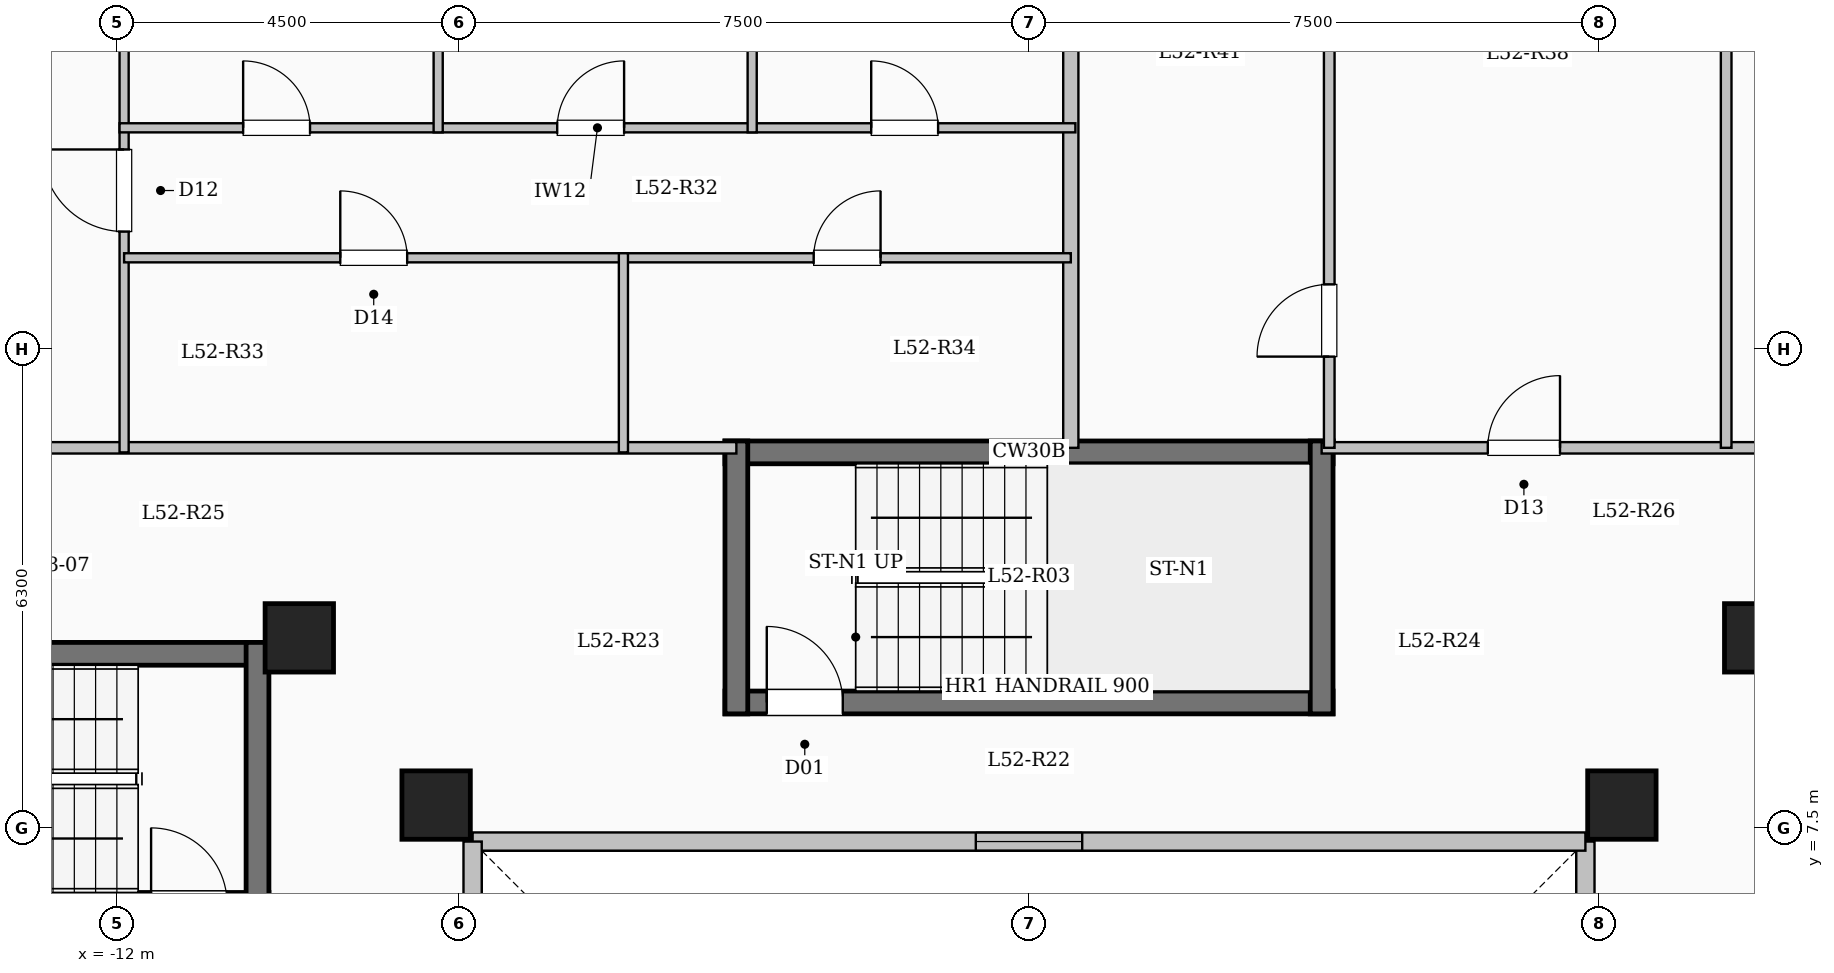
"""IFC4 building model, lengths in metres.
Left out: names, types, materials, properties, quantities, classifications, styles, units other than length and angle.
Written with IfcOpenShell. Run it as: python <this file> out.ifc"""

import sys

from ifc_helpers import new_model, si_unit, direction, frame, frame_2d, origin, origin_2d, place, context, subcontext, project, spatial, rectangle, extrude, element, fill, save


model = new_model("IFC4")
c1 = context("Model", 3, precision=1e-05, world=origin(), true_north=direction((0.0, 1.0)))
c2 = subcontext(c1, "Body", "Model", "MODEL_VIEW")
j1 = project(units=[si_unit("LENGTHUNIT", "METRE"), si_unit("PLANEANGLEUNIT", "RADIAN")], contexts=[c1])
p1 = place(None, origin())
s1 = spatial("IfcSite", under=j1, at=p1, CompositionType="ELEMENT")
p2 = place(p1, origin())
s2 = spatial("IfcBuilding", under=s1, at=p2, CompositionType="ELEMENT")
p3 = place(p2, frame((0.0, 0.0, 193.6)))
s3 = spatial("IfcBuildingStorey", under=s2, at=p3, CompositionType="ELEMENT", Elevation=193.6)
for number, where, z_axis, x_axis in (
    (1, (-7.8, 7.8, 0.0), (0.0, 0.0, 1.0), (1.0, 0.0, 0.0)),
    (2, (7.8, 7.8, 0.0), (0.0, 0.0, 1.0), (1.0, 0.0, 0.0)),
    (3, (-9.6, 10.0, 0.0), (0.0, 0.0, 1.0), (1.0, 0.0, 0.0)),
    (4, (9.6, 10.0, 0.0), (0.0, 0.0, 1.0), (1.0, 0.0, 0.0)),
):
    element("IfcColumn", number, at=place(p3, frame(where, z_axis=z_axis, x_axis=x_axis)), inside=s3, PredefinedType="COLUMN", context=c2, shape_type="SweptSolid", body=[
        extrude(rectangle(XDim=0.9, YDim=0.9, at=origin_2d()), origin(), (0.0, 0.0, 1.0), 3.35),
    ])
p4 = place(p3, frame((7.32, -7.32, 0.0), z_axis=(0.0, 0.0, 1.0), x_axis=(0.0, 1.0, 0.0)))
e5 = element("IfcWall", 5, at=p4, inside=s3, PredefinedType="SOLIDWALL", context=c2, shape_type="SweptSolid", body=[
    extrude(rectangle(XDim=14.64, YDim=0.24, at=frame_2d((7.32, 0.0))), origin(), (0.0, 0.0, 1.0), 3.1),
])
p5 = place(p4, frame((6.62, 0.0, 0.95)))
e6 = element("IfcOpeningElement", 6, at=p5, cuts=e5, PredefinedType="OPENING", context=c2, shape_type="SweptSolid", body=[
    extrude(rectangle(XDim=1.4, YDim=1.5, at=frame_2d((0.7, 0.75))), frame((0.0, 0.13, 0.0), z_axis=(0.0, -1.0, 0.0), x_axis=(1.0, 0.0, 0.0)), (0.0, 0.0, 1.0), 0.26),
])
p6 = place(p3, frame((7.32, 7.32, 0.0), z_axis=(0.0, 0.0, 1.0), x_axis=(-1.0, 0.0, 0.0)))
e7 = element("IfcWall", 7, at=p6, inside=s3, PredefinedType="SOLIDWALL", context=c2, shape_type="SweptSolid", body=[
    extrude(rectangle(XDim=14.64, YDim=0.24, at=frame_2d((7.32, 0.0))), origin(), (0.0, 0.0, 1.0), 3.1),
])
p7 = place(p6, frame((6.62, 0.0, 0.95)))
e8 = element("IfcOpeningElement", 8, at=p7, cuts=e7, PredefinedType="OPENING", context=c2, shape_type="SweptSolid", body=[
    extrude(rectangle(XDim=1.4, YDim=1.5, at=frame_2d((0.7, 0.75))), frame((0.0, 0.13, 0.0), z_axis=(0.0, -1.0, 0.0), x_axis=(1.0, 0.0, 0.0)), (0.0, 0.0, 1.0), 0.26),
])
p8 = place(p3, frame((-7.32, 7.32, 0.0), z_axis=(0.0, 0.0, 1.0), x_axis=(0.0, -1.0, 0.0)))
e9 = element("IfcWall", 9, at=p8, inside=s3, PredefinedType="SOLIDWALL", context=c2, shape_type="SweptSolid", body=[
    extrude(rectangle(XDim=14.64, YDim=0.24, at=frame_2d((7.32, 0.0))), origin(), (0.0, 0.0, 1.0), 3.1),
])
p9 = place(p8, frame((6.62, 0.0, 0.95)))
e10 = element("IfcOpeningElement", 10, at=p9, cuts=e9, PredefinedType="OPENING", context=c2, shape_type="SweptSolid", body=[
    extrude(rectangle(XDim=1.4, YDim=1.5, at=frame_2d((0.7, 0.75))), frame((0.0, 0.13, 0.0), z_axis=(0.0, -1.0, 0.0), x_axis=(1.0, 0.0, 0.0)), (0.0, 0.0, 1.0), 0.26),
])
p10 = place(p3, frame((-18.0, 9.79, 0.0), z_axis=(0.0, 0.0, 1.0), x_axis=(1.0, 0.0, 0.0)))
e11 = element("IfcWall", 11, at=p10, inside=s3, PredefinedType="SHEAR", context=c2, shape_type="SweptSolid", body=[
    extrude(rectangle(XDim=8.0, YDim=0.3, at=frame_2d((4.0, 0.0))), origin(), (0.0, 0.0, 1.0), 3.35),
])
p11 = place(p3, frame((-18.0, 6.5, 0.0), z_axis=(0.0, 0.0, 1.0), x_axis=(1.0, 0.0, 0.0)))
e12 = element("IfcWall", 12, at=p11, inside=s3, PredefinedType="SHEAR", context=c2, shape_type="SweptSolid", body=[
    extrude(rectangle(XDim=8.0, YDim=0.3, at=frame_2d((4.0, 0.0))), origin(), (0.0, 0.0, 1.0), 3.35),
])
p12 = place(p11, frame((6.45, 0.0, 0.0)))
e13 = element("IfcOpeningElement", 13, at=p12, cuts=e12, PredefinedType="OPENING", context=c2, shape_type="SweptSolid", body=[
    extrude(rectangle(XDim=1.0, YDim=2.15, at=frame_2d((0.5, 1.075))), frame((0.0, 0.16, 0.0), z_axis=(0.0, -1.0, 0.0), x_axis=(1.0, 0.0, 0.0)), (0.0, 0.0, 1.0), 0.32),
])
p13 = place(p3, frame((-10.15, 6.35, 0.0), z_axis=(0.0, 0.0, 1.0), x_axis=(0.0, 1.0, 0.0)))
e14 = element("IfcWall", 14, at=p13, inside=s3, PredefinedType="SHEAR", context=c2, shape_type="SweptSolid", body=[
    extrude(rectangle(XDim=3.59, YDim=0.3, at=frame_2d((1.795, 0.0))), origin(), (0.0, 0.0, 1.0), 3.35),
])
p14 = place(p3, frame((-4.0, 12.44, 0.0), z_axis=(0.0, 0.0, 1.0), x_axis=(1.0, 0.0, 0.0)))
e15 = element("IfcWall", 15, at=p14, inside=s3, PredefinedType="SHEAR", context=c2, shape_type="SweptSolid", body=[
    extrude(rectangle(XDim=8.0, YDim=0.3, at=frame_2d((4.0, 0.0))), origin(), (0.0, 0.0, 1.0), 3.35),
])
p15 = place(p3, frame((-4.0, 9.15, 0.0), z_axis=(0.0, 0.0, 1.0), x_axis=(1.0, 0.0, 0.0)))
e16 = element("IfcWall", 16, at=p15, inside=s3, PredefinedType="SHEAR", context=c2, shape_type="SweptSolid", body=[
    extrude(rectangle(XDim=8.0, YDim=0.3, at=frame_2d((4.0, 0.0))), origin(), (0.0, 0.0, 1.0), 3.35),
])
p16 = place(p15, frame((0.55, 0.0, 0.0)))
e17 = element("IfcOpeningElement", 17, at=p16, cuts=e16, PredefinedType="OPENING", context=c2, shape_type="SweptSolid", body=[
    extrude(rectangle(XDim=1.0, YDim=2.15, at=frame_2d((0.5, 1.075))), frame((0.0, 0.16, 0.0), z_axis=(0.0, -1.0, 0.0), x_axis=(1.0, 0.0, 0.0)), (0.0, 0.0, 1.0), 0.32),
])
for number, where, z_axis, x_axis in (
    (18, (-3.85, 9.0, 0.0), (0.0, 0.0, 1.0), (0.0, 1.0, 0.0)),
    (19, (3.85, 9.0, 0.0), (0.0, 0.0, 1.0), (0.0, 1.0, 0.0)),
):
    element("IfcWall", number, at=place(p3, frame(where, z_axis=z_axis, x_axis=x_axis)), inside=s3, PredefinedType="SHEAR", context=c2, shape_type="SweptSolid", body=[
        extrude(rectangle(XDim=3.59, YDim=0.3, at=frame_2d((1.795, 0.0))), origin(), (0.0, 0.0, 1.0), 3.35),
    ])
p17 = place(p3, frame((-18.35, 12.5, 0.0), z_axis=(0.0, 0.0, 1.0), x_axis=(1.0, 0.0, 0.0)))
e20 = element("IfcWall", 20, at=p17, inside=s3, PredefinedType="PARTITIONING", context=c2, shape_type="SweptSolid", body=[
    extrude(rectangle(XDim=14.5, YDim=0.15, at=frame_2d((7.25, 0.0))), origin(), (0.0, 0.0, 1.0), 3.1),
])
p18 = place(p17, frame((0.7, 0.0, 0.0)))
e21 = element("IfcOpeningElement", 21, at=p18, cuts=e20, PredefinedType="OPENING", context=c2, shape_type="SweptSolid", body=[
    extrude(rectangle(XDim=0.96, YDim=2.15, at=frame_2d((0.48, 1.075))), frame((0.0, 0.085, 0.0), z_axis=(0.0, -1.0, 0.0), x_axis=(1.0, 0.0, 0.0)), (0.0, 0.0, 1.0), 0.17),
])
p19 = place(p3, frame((3.85, 12.5, 0.0), z_axis=(0.0, 0.0, 1.0), x_axis=(1.0, 0.0, 0.0)))
e22 = element("IfcWall", 22, at=p19, inside=s3, PredefinedType="PARTITIONING", context=c2, shape_type="SweptSolid", body=[
    extrude(rectangle(XDim=14.5, YDim=0.15, at=frame_2d((7.25, 0.0))), origin(), (0.0, 0.0, 1.0), 3.1),
])
p20 = place(p19, frame((2.186, 0.0, 0.0)))
e23 = element("IfcOpeningElement", 23, at=p20, cuts=e22, PredefinedType="OPENING", context=c2, shape_type="SweptSolid", body=[
    extrude(rectangle(XDim=0.95, YDim=2.15, at=frame_2d((0.475, 1.075))), frame((0.0, 0.085, 0.0), z_axis=(0.0, -1.0, 0.0), x_axis=(1.0, 0.0, 0.0)), (0.0, 0.0, 1.0), 0.17),
])
p21 = place(p19, frame((7.379, 0.0, 0.0)))
e24 = element("IfcOpeningElement", 24, at=p21, cuts=e22, PredefinedType="OPENING", context=c2, shape_type="SweptSolid", body=[
    extrude(rectangle(XDim=0.95, YDim=2.15, at=frame_2d((0.475, 1.075))), frame((0.0, 0.085, 0.0), z_axis=(0.0, -1.0, 0.0), x_axis=(1.0, 0.0, 0.0)), (0.0, 0.0, 1.0), 0.17),
])
p22 = place(p19, frame((11.998, 0.0, 0.0)))
e25 = element("IfcOpeningElement", 25, at=p22, cuts=e22, PredefinedType="OPENING", context=c2, shape_type="SweptSolid", body=[
    extrude(rectangle(XDim=0.95, YDim=2.15, at=frame_2d((0.475, 1.075))), frame((0.0, 0.085, 0.0), z_axis=(0.0, -1.0, 0.0), x_axis=(1.0, 0.0, 0.0)), (0.0, 0.0, 1.0), 0.17),
])
p23 = place(p3, frame((0.55, 12.5, 0.0), z_axis=(0.0, 0.0, 1.0), x_axis=(0.0, 1.0, 0.0)))
e26 = element("IfcWall", 26, at=p23, inside=s3, PredefinedType="SOLIDWALL", context=c2, shape_type="SweptSolid", body=[
    extrude(rectangle(XDim=9.88, YDim=0.2, at=frame_2d((4.94, 0.0))), origin(), (0.0, 0.0, 1.0), 3.1),
])
p24 = place(p3, frame((-11.905, 12.44, 0.0), z_axis=(0.0, 0.0, 1.0), x_axis=(0.0, 1.0, 0.0)))
e27 = element("IfcWall", 27, at=p24, inside=s3, PredefinedType="PARTITIONING", context=c2, shape_type="SweptSolid", body=[
    extrude(rectangle(XDim=8.46, YDim=0.12, at=frame_2d((4.23, 0.0))), origin(), (0.0, 0.0, 1.0), 3.1),
])
p25 = place(p24, frame((2.905, 0.0, 0.0)))
e28 = element("IfcOpeningElement", 28, at=p25, cuts=e27, PredefinedType="OPENING", context=c2, shape_type="SweptSolid", body=[
    extrude(rectangle(XDim=1.08, YDim=2.15, at=frame_2d((0.54, 1.075))), frame((0.0, 0.07, 0.0), z_axis=(0.0, -1.0, 0.0), x_axis=(1.0, 0.0, 0.0)), (0.0, 0.0, 1.0), 0.14),
])
p26 = place(p3, frame((-11.905, 15.0, 0.0), z_axis=(0.0, 0.0, 1.0), x_axis=(1.0, 0.0, 0.0)))
e29 = element("IfcWall", 29, at=p26, inside=s3, PredefinedType="PARTITIONING", context=c2, shape_type="SweptSolid", body=[
    extrude(rectangle(XDim=6.569, YDim=0.12, at=frame_2d((3.285, 0.0))), origin(), (0.0, 0.0, 1.0), 3.1),
])
p27 = place(p26, frame((2.844, 0.0, 0.0)))
e30 = element("IfcOpeningElement", 30, at=p27, cuts=e29, PredefinedType="OPENING", context=c2, shape_type="SweptSolid", body=[
    extrude(rectangle(XDim=0.88, YDim=2.1, at=frame_2d((0.44, 1.05))), frame((0.0, 0.07, 0.0), z_axis=(0.0, -1.0, 0.0), x_axis=(1.0, 0.0, 0.0)), (0.0, 0.0, 1.0), 0.14),
])
p28 = place(p3, frame((-5.336, 15.0, 0.0), z_axis=(0.0, 0.0, 1.0), x_axis=(1.0, 0.0, 0.0)))
e31 = element("IfcWall", 31, at=p28, inside=s3, PredefinedType="PARTITIONING", context=c2, shape_type="SweptSolid", body=[
    extrude(rectangle(XDim=5.886, YDim=0.12, at=frame_2d((2.943, 0.0))), origin(), (0.0, 0.0, 1.0), 3.1),
])
p29 = place(p28, frame((2.503, 0.0, 0.0)))
e32 = element("IfcOpeningElement", 32, at=p29, cuts=e31, PredefinedType="OPENING", context=c2, shape_type="SweptSolid", body=[
    extrude(rectangle(XDim=0.88, YDim=2.1, at=frame_2d((0.44, 1.05))), frame((0.0, 0.07, 0.0), z_axis=(0.0, -1.0, 0.0), x_axis=(1.0, 0.0, 0.0)), (0.0, 0.0, 1.0), 0.14),
])
p30 = place(p3, frame((-11.965, 16.71, 0.0), z_axis=(0.0, 0.0, 1.0), x_axis=(1.0, 0.0, 0.0)))
e33 = element("IfcWall", 33, at=p30, inside=s3, PredefinedType="PARTITIONING", context=c2, shape_type="SweptSolid", body=[
    extrude(rectangle(XDim=12.575, YDim=0.12, at=frame_2d((6.288, 0.0))), origin(), (0.0, 0.0, 1.0), 2.725),
])
p31 = place(p30, frame((1.626, 0.0, 0.0)))
e34 = element("IfcOpeningElement", 34, at=p31, cuts=e33, PredefinedType="OPENING", context=c2, shape_type="SweptSolid", body=[
    extrude(rectangle(XDim=0.88, YDim=2.1, at=frame_2d((0.44, 1.05))), frame((0.0, 0.07, 0.0), z_axis=(0.0, -1.0, 0.0), x_axis=(1.0, 0.0, 0.0)), (0.0, 0.0, 1.0), 0.14),
])
p32 = place(p30, frame((5.758, 0.0, 0.0)))
e35 = element("IfcOpeningElement", 35, at=p32, cuts=e33, PredefinedType="OPENING", context=c2, shape_type="SweptSolid", body=[
    extrude(rectangle(XDim=0.88, YDim=2.1, at=frame_2d((0.44, 1.05))), frame((0.0, 0.07, 0.0), z_axis=(0.0, -1.0, 0.0), x_axis=(1.0, 0.0, 0.0)), (0.0, 0.0, 1.0), 0.14),
])
p33 = place(p30, frame((9.889, 0.0, 0.0)))
e36 = element("IfcOpeningElement", 36, at=p33, cuts=e33, PredefinedType="OPENING", context=c2, shape_type="SweptSolid", body=[
    extrude(rectangle(XDim=0.88, YDim=2.1, at=frame_2d((0.44, 1.05))), frame((0.0, 0.07, 0.0), z_axis=(0.0, -1.0, 0.0), x_axis=(1.0, 0.0, 0.0)), (0.0, 0.0, 1.0), 0.14),
])
p34 = place(p3, frame((-5.336, 12.44, 0.0), z_axis=(0.0, 0.0, 1.0), x_axis=(0.0, 1.0, 0.0)))
e37 = element("IfcWall", 37, at=p34, inside=s3, PredefinedType="PARTITIONING", context=c2, shape_type="SweptSolid", body=[
    extrude(rectangle(XDim=2.62, YDim=0.12, at=frame_2d((1.31, 0.0))), origin(), (0.0, 0.0, 1.0), 3.1),
])
p35 = place(p3, frame((-7.773, 16.65, 0.0), z_axis=(0.0, 0.0, 1.0), x_axis=(0.0, 1.0, 0.0)))
e38 = element("IfcWall", 38, at=p35, inside=s3, PredefinedType="PARTITIONING", context=c2, shape_type="SweptSolid", body=[
    extrude(rectangle(XDim=5.046, YDim=0.12, at=frame_2d((2.523, 0.0))), origin(), (0.0, 0.0, 1.0), 2.585),
])
p36 = place(p3, frame((-3.642, 16.65, 0.0), z_axis=(0.0, 0.0, 1.0), x_axis=(0.0, 1.0, 0.0)))
e39 = element("IfcWall", 39, at=p36, inside=s3, PredefinedType="PARTITIONING", context=c2, shape_type="SweptSolid", body=[
    extrude(rectangle(XDim=5.73, YDim=0.12, at=frame_2d((2.865, 0.0))), origin(), (0.0, 0.0, 1.0), 3.1),
])
p37 = place(p3, frame((3.95, 12.5, 0.0), z_axis=(0.0, 0.0, 1.0), x_axis=(0.0, 1.0, 0.0)))
e40 = element("IfcWall", 40, at=p37, inside=s3, PredefinedType="PARTITIONING", context=c2, shape_type="SweptSolid", body=[
    extrude(rectangle(XDim=8.35, YDim=0.14, at=frame_2d((4.175, 0.0))), origin(), (0.0, 0.0, 1.0), 3.1),
])
p38 = place(p37, frame((1.2, 0.0, 0.0)))
e41 = element("IfcOpeningElement", 41, at=p38, cuts=e40, PredefinedType="OPENING", context=c2, shape_type="SweptSolid", body=[
    extrude(rectangle(XDim=0.95, YDim=2.15, at=frame_2d((0.475, 1.075))), frame((0.0, 0.08, 0.0), z_axis=(0.0, -1.0, 0.0), x_axis=(1.0, 0.0, 0.0)), (0.0, 0.0, 1.0), 0.16),
])
p39 = place(p3, frame((9.172, 12.5, 0.0), z_axis=(0.0, 0.0, 1.0), x_axis=(0.0, 1.0, 0.0)))
e42 = element("IfcWall", 42, at=p39, inside=s3, PredefinedType="PARTITIONING", context=c2, shape_type="SweptSolid", body=[
    extrude(rectangle(XDim=8.35, YDim=0.14, at=frame_2d((4.175, 0.0))), origin(), (0.0, 0.0, 1.0), 3.1),
])
p40 = place(p7, origin())
e43 = element("IfcWindow", 43, at=p40, inside=s3, PartitioningType="SINGLE_PANEL", PredefinedType="WINDOW", context=c2, shape_type="SweptSolid", body=[
    extrude(rectangle(XDim=1.4, YDim=1.5, at=frame_2d((0.7, 0.75))), frame((0.0, 0.03, 0.0), z_axis=(0.0, -1.0, 0.0), x_axis=(1.0, 0.0, 0.0)), (0.0, 0.0, 1.0), 0.06),
])
fill(e8, e43)
p41 = place(p16, origin())
e44 = element("IfcDoor", 44, at=p41, inside=s3, OperationType="SINGLE_SWING_LEFT", PredefinedType="DOOR", context=c2, shape_type="SweptSolid", body=[
    extrude(rectangle(XDim=1.0, YDim=2.15, at=frame_2d((0.5, 1.075))), frame((0.0, 0.025, 0.0), z_axis=(0.0, -1.0, 0.0), x_axis=(1.0, 0.0, 0.0)), (0.0, 0.0, 1.0), 0.05),
])
fill(e17, e44)
p42 = place(p25, origin())
e45 = element("IfcDoor", 45, at=p42, inside=s3, OperationType="SINGLE_SWING_RIGHT", PredefinedType="DOOR", context=c2, shape_type="SweptSolid", body=[
    extrude(rectangle(XDim=1.08, YDim=2.15, at=frame_2d((0.54, 1.075))), frame((0.0, 0.025, 0.0), z_axis=(0.0, -1.0, 0.0), x_axis=(1.0, 0.0, 0.0)), (0.0, 0.0, 1.0), 0.05),
])
fill(e28, e45)
p43 = place(p27, origin())
e46 = element("IfcDoor", 46, at=p43, inside=s3, OperationType="SINGLE_SWING_LEFT", PredefinedType="DOOR", context=c2, shape_type="SweptSolid", body=[
    extrude(rectangle(XDim=0.88, YDim=2.1, at=frame_2d((0.44, 1.05))), frame((0.0, 0.025, 0.0), z_axis=(0.0, -1.0, 0.0), x_axis=(1.0, 0.0, 0.0)), (0.0, 0.0, 1.0), 0.05),
])
fill(e30, e46)
p44 = place(p29, origin())
e47 = element("IfcDoor", 47, at=p44, inside=s3, OperationType="SINGLE_SWING_RIGHT", PredefinedType="DOOR", context=c2, shape_type="SweptSolid", body=[
    extrude(rectangle(XDim=0.88, YDim=2.1, at=frame_2d((0.44, 1.05))), frame((0.0, 0.025, 0.0), z_axis=(0.0, -1.0, 0.0), x_axis=(1.0, 0.0, 0.0)), (0.0, 0.0, 1.0), 0.05),
])
fill(e32, e47)
p45 = place(p31, origin())
e48 = element("IfcDoor", 48, at=p45, inside=s3, OperationType="SINGLE_SWING_LEFT", PredefinedType="DOOR", context=c2, shape_type="SweptSolid", body=[
    extrude(rectangle(XDim=0.88, YDim=2.1, at=frame_2d((0.44, 1.05))), frame((0.0, 0.025, 0.0), z_axis=(0.0, -1.0, 0.0), x_axis=(1.0, 0.0, 0.0)), (0.0, 0.0, 1.0), 0.05),
])
fill(e34, e48)
p46 = place(p32, origin())
e49 = element("IfcDoor", 49, at=p46, inside=s3, OperationType="SINGLE_SWING_RIGHT", PredefinedType="DOOR", context=c2, shape_type="SweptSolid", body=[
    extrude(rectangle(XDim=0.88, YDim=2.1, at=frame_2d((0.44, 1.05))), frame((0.0, 0.025, 0.0), z_axis=(0.0, -1.0, 0.0), x_axis=(1.0, 0.0, 0.0)), (0.0, 0.0, 1.0), 0.05),
])
fill(e35, e49)
p47 = place(p33, origin())
e50 = element("IfcDoor", 50, at=p47, inside=s3, OperationType="SINGLE_SWING_LEFT", PredefinedType="DOOR", context=c2, shape_type="SweptSolid", body=[
    extrude(rectangle(XDim=0.88, YDim=2.1, at=frame_2d((0.44, 1.05))), frame((0.0, 0.025, 0.0), z_axis=(0.0, -1.0, 0.0), x_axis=(1.0, 0.0, 0.0)), (0.0, 0.0, 1.0), 0.05),
])
fill(e36, e50)
p48 = place(p20, origin())
e51 = element("IfcDoor", 51, at=p48, inside=s3, OperationType="SINGLE_SWING_RIGHT", PredefinedType="DOOR", context=c2, shape_type="SweptSolid", body=[
    extrude(rectangle(XDim=0.95, YDim=2.15, at=frame_2d((0.475, 1.075))), frame((0.0, 0.025, 0.0), z_axis=(0.0, -1.0, 0.0), x_axis=(1.0, 0.0, 0.0)), (0.0, 0.0, 1.0), 0.05),
])
fill(e23, e51)
p49 = place(p38, origin())
e52 = element("IfcDoor", 52, at=p49, inside=s3, OperationType="SINGLE_SWING_LEFT", PredefinedType="DOOR", context=c2, shape_type="SweptSolid", body=[
    extrude(rectangle(XDim=0.95, YDim=2.15, at=frame_2d((0.475, 1.075))), frame((0.0, 0.025, 0.0), z_axis=(0.0, -1.0, 0.0), x_axis=(1.0, 0.0, 0.0)), (0.0, 0.0, 1.0), 0.05),
])
fill(e41, e52)
save(model, sys.argv[1])
